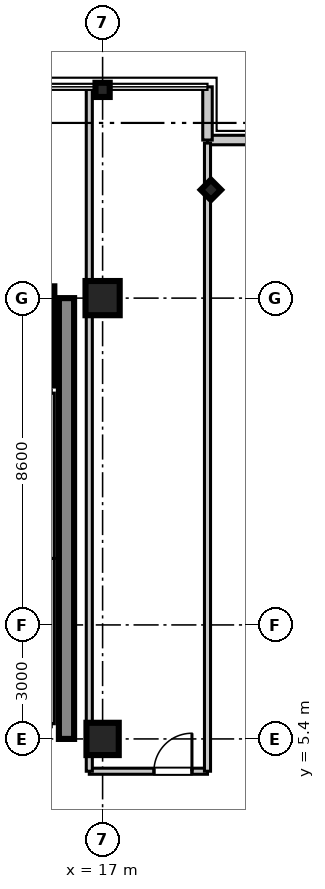
"""IFC4 building model, lengths in metres.
Left out: names, types, materials, properties, quantities, classifications, styles, units other than length and angle.
Written with IfcOpenShell. Run it as: python <this file> out.ifc"""

import sys

from ifc_helpers import new_model, si_unit, direction, frame, frame_2d, origin, origin_2d, place, context, subcontext, project, spatial, rectangle, i_section, extrude, source, transform, mapped, element, fill, save


model = new_model("IFC4")
c1 = context("Model", 3, precision=1e-05, world=origin(), true_north=direction((0.0, 1.0)))
c2 = subcontext(c1, "Body", "Model", "MODEL_VIEW")
j1 = project(units=[si_unit("LENGTHUNIT", "METRE"), si_unit("PLANEANGLEUNIT", "RADIAN")], contexts=[c1])
p1 = place(None, origin())
s1 = spatial("IfcSite", under=j1, at=p1, CompositionType="ELEMENT")
p2 = place(p1, origin())
s2 = spatial("IfcBuilding", under=s1, at=p2, CompositionType="ELEMENT")
p3 = place(p2, frame((0.0, 0.0, 311.9)))
s3 = spatial("IfcBuildingStorey", under=s2, at=p3, CompositionType="ELEMENT", Elevation=311.9)
m1 = source(origin(), c2, "Body", "SweptSolid", [
    extrude(rectangle(XDim=0.85, YDim=0.85, at=origin_2d()), origin(), (0.0, 0.0, 1.0), 3.805),
])
p4 = place(p3, frame((17.0, 5.4, 0.0), z_axis=(0.0, 0.0, 1.0), x_axis=(1.0, 0.0, 0.0)))
e1 = element("IfcColumn", 1, at=p4, inside=s3, PredefinedType="PILASTER", context=c2, shape_type="MappedRepresentation", body=[
    mapped(m1, transform((0.0, 0.0, 0.0), scale=1.0)),
])
m2 = source(origin(), c2, "Body", "SweptSolid", [
    extrude(rectangle(XDim=0.9, YDim=0.9, at=origin_2d()), origin(), (0.0, 0.0, 1.0), 3.805),
])
p5 = place(p3, frame((17.0, 17.0, 0.0), z_axis=(0.0, 0.0, 1.0), x_axis=(1.0, 0.0, 0.0)))
e2 = element("IfcColumn", 2, at=p5, inside=s3, PredefinedType="COLUMN", context=c2, shape_type="MappedRepresentation", body=[
    mapped(m2, transform((0.0, 0.0, 0.0), scale=1.0)),
])
m3 = source(origin(), c2, "Body", "SweptSolid", [
    extrude(i_section(OverallWidth=0.374, OverallDepth=0.374, WebThickness=0.014, FlangeThickness=0.023, at=origin_2d()), origin(), (0.0, 0.0, 1.0), 3.805),
])
for number, where, z_axis, x_axis in (
    (3, (17.0, 22.48, 0.0), (0.0, 0.0, 1.0), (0.0, 1.0, 0.0)),
    (4, (19.85, 19.85, 0.0), (0.0, 0.0, 1.0), (0.707, 0.707, 0.0)),
):
    element("IfcColumn", number, at=place(p3, frame(where, z_axis=z_axis, x_axis=x_axis)), inside=s3, PredefinedType="COLUMN", context=c2, shape_type="MappedRepresentation", body=[
        mapped(m3, transform((0.0, 0.0, 0.0), scale=1.0)),
    ])
m4 = source(origin(), c2, "Body", "SweptSolid", [
    extrude(rectangle(XDim=11.6, YDim=0.4, at=frame_2d((5.8, 0.0))), origin(), (0.0, 0.0, 1.0), 3.55),
])
p6 = place(p3, frame((16.05, 5.4, 0.0), z_axis=(0.0, 0.0, 1.0), x_axis=(0.0, 1.0, 0.0)))
e5 = element("IfcWall", 5, at=p6, inside=s3, PredefinedType="SHEAR", context=c2, shape_type="MappedRepresentation", body=[
    mapped(m4, transform((0.0, 0.0, 0.0), scale=1.0)),
])
m5 = source(origin(), c2, "Body", "SweptSolid", [
    extrude(rectangle(XDim=2.61, YDim=0.22, at=frame_2d((1.305, 0.0))), origin(), (0.0, 0.0, 1.0), 3.55),
])
p7 = place(p3, frame((15.62, 14.7, 0.0), z_axis=(0.0, 0.0, 1.0), x_axis=(0.0, 1.0, 0.0)))
e6 = element("IfcWall", 6, at=p7, inside=s3, PredefinedType="SHEAR", context=c2, shape_type="MappedRepresentation", body=[
    mapped(m5, transform((0.0, 0.0, 0.0), scale=1.0)),
])
m6 = source(origin(), c2, "Body", "SweptSolid", [
    extrude(rectangle(XDim=1.4, YDim=0.25, at=frame_2d((0.7, 0.0))), origin(), (0.0, 0.0, 1.0), 3.55),
])
p8 = place(p3, frame((19.76, 21.16, 0.0), z_axis=(0.0, 0.0, 1.0), x_axis=(1.0, 0.0, 0.0)))
e7 = element("IfcWall", 7, at=p8, inside=s3, PredefinedType="STANDARD", context=c2, shape_type="MappedRepresentation", body=[
    mapped(m6, transform((0.0, 0.0, 0.0), scale=1.0)),
])
m7 = source(origin(), c2, "Body", "SweptSolid", [
    extrude(rectangle(XDim=1.4, YDim=0.25, at=frame_2d((0.7, 0.0))), origin(), (0.0, 0.0, 1.0), 3.55),
])
p9 = place(p3, frame((19.76, 21.16, 0.0), z_axis=(0.0, 0.0, 1.0), x_axis=(0.0, 1.0, 0.0)))
e8 = element("IfcWall", 8, at=p9, inside=s3, PredefinedType="STANDARD", context=c2, shape_type="MappedRepresentation", body=[
    mapped(m7, transform((0.0, 0.0, 0.0), scale=1.0)),
])
m8 = source(origin(), c2, "Body", "SweptSolid", [
    extrude(rectangle(XDim=4.35, YDim=0.16, at=frame_2d((2.175, 0.0))), origin(), (0.0, 0.0, 1.0), 2.89),
])
p10 = place(p3, frame((15.65, 5.8, 0.0), z_axis=(0.0, 0.0, 1.0), x_axis=(0.0, 1.0, 0.0)))
e9 = element("IfcWall", 9, at=p10, inside=s3, PredefinedType="PARTITIONING", context=c2, shape_type="MappedRepresentation", body=[
    mapped(m8, transform((0.0, 0.0, 0.0), scale=1.0)),
])
m9 = source(origin(), c2, "Body", "SweptSolid", [
    extrude(rectangle(XDim=4.35, YDim=0.16, at=frame_2d((2.175, 0.0))), origin(), (0.0, 0.0, 1.0), 2.89),
])
p11 = place(p3, frame((15.65, 10.15, 0.0), z_axis=(0.0, 0.0, 1.0), x_axis=(0.0, 1.0, 0.0)))
e10 = element("IfcWall", 10, at=p11, inside=s3, PredefinedType="PARTITIONING", context=c2, shape_type="MappedRepresentation", body=[
    mapped(m9, transform((0.0, 0.0, 0.0), scale=1.0)),
])
m10 = source(origin(), c2, "Body", "SweptSolid", [
    extrude(rectangle(XDim=3.11, YDim=0.16, at=frame_2d((1.555, 0.0))), origin(), (0.0, 0.0, 1.0), 2.89),
])
p12 = place(p3, frame((16.65, 4.55, 0.0), z_axis=(0.0, 0.0, 1.0), x_axis=(1.0, 0.0, 0.0)))
e11 = element("IfcWall", 11, at=p12, inside=s3, PredefinedType="PARTITIONING", context=c2, shape_type="MappedRepresentation", body=[
    mapped(m10, transform((0.0, 0.0, 0.0), scale=1.0)),
])
p13 = place(p12, frame((1.701, 0.0, 0.0)))
e12 = element("IfcOpeningElement", 12, at=p13, cuts=e11, PredefinedType="OPENING", context=c2, shape_type="SweptSolid", body=[
    extrude(rectangle(XDim=1.0, YDim=2.1, at=frame_2d((0.5, 1.05))), frame((0.0, 0.09, 0.0), z_axis=(0.0, -1.0, 0.0), x_axis=(1.0, 0.0, 0.0)), (0.0, 0.0, 1.0), 0.18),
])
m11 = source(origin(), c2, "Body", "SweptSolid", [
    extrude(rectangle(XDim=17.95, YDim=0.16, at=frame_2d((8.975, 0.0))), origin(), (0.0, 0.0, 1.0), 2.89),
])
p14 = place(p3, frame((16.65, 4.55, 0.0), z_axis=(0.0, 0.0, 1.0), x_axis=(0.0, 1.0, 0.0)))
e13 = element("IfcWall", 13, at=p14, inside=s3, PredefinedType="PARTITIONING", context=c2, shape_type="MappedRepresentation", body=[
    mapped(m11, transform((0.0, 0.0, 0.0), scale=1.0)),
])
m12 = source(origin(), c2, "Body", "SweptSolid", [
    extrude(rectangle(XDim=16.53, YDim=0.16, at=frame_2d((8.265, 0.0))), origin(), (0.0, 0.0, 1.0), 2.89),
])
p15 = place(p3, frame((19.76, 4.55, 0.0), z_axis=(0.0, 0.0, 1.0), x_axis=(0.0, 1.0, 0.0)))
e14 = element("IfcWall", 14, at=p15, inside=s3, PredefinedType="PARTITIONING", context=c2, shape_type="MappedRepresentation", body=[
    mapped(m12, transform((0.0, 0.0, 0.0), scale=1.0)),
])
m13 = source(origin(), c2, "Body", "SweptSolid", [
    extrude(rectangle(XDim=1.0, YDim=2.1, at=frame_2d((0.5, 1.05))), frame((0.0, 0.025, 0.0), z_axis=(0.0, -1.0, 0.0), x_axis=(1.0, 0.0, 0.0)), (0.0, 0.0, 1.0), 0.05),
])
p16 = place(p13, origin())
e15 = element("IfcDoor", 15, at=p16, inside=s3, OperationType="SINGLE_SWING_RIGHT", PredefinedType="DOOR", context=c2, shape_type="MappedRepresentation", body=[
    mapped(m13, transform((0.0, 0.0, 0.0), scale=1.0)),
])
fill(e12, e15)
save(model, sys.argv[1])
